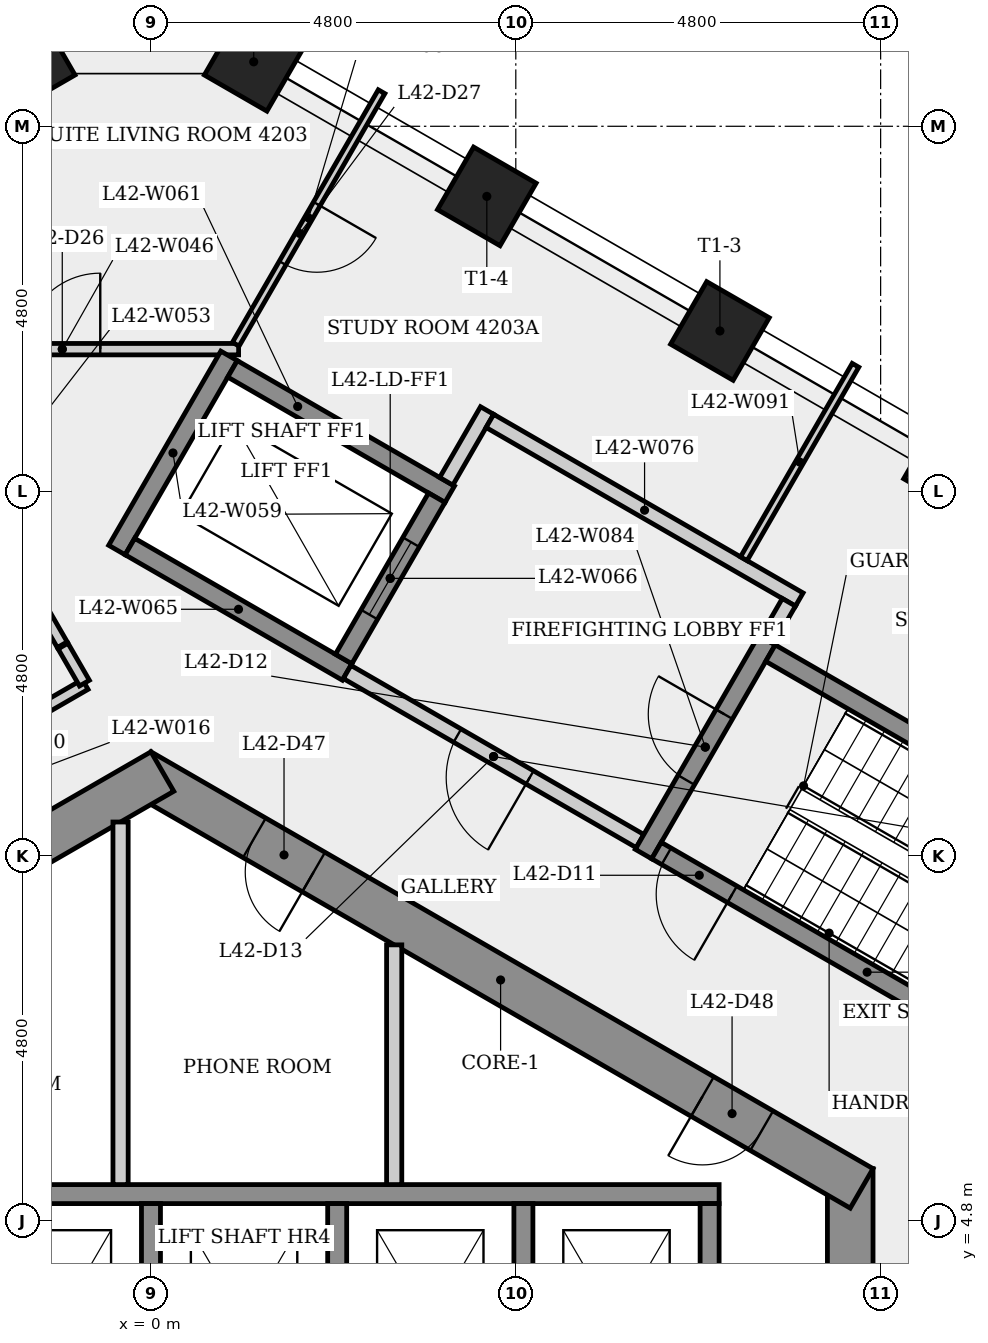
"""IFC4 building model, lengths in metres.
Left out: names, types, materials, properties, quantities, classifications, styles, units other than length and angle.
Written with IfcOpenShell. Run it as: python <this file> out.ifc"""

import sys

from ifc_helpers import new_model, si_unit, direction, frame, frame_2d, origin, origin_2d, place, context, subcontext, project, spatial, rectangle, extrude, element, fill, save


model = new_model("IFC4")
c1 = context("Model", 3, precision=1e-05, world=origin(), true_north=direction((0.0, 1.0)))
c2 = subcontext(c1, "Body", "Model", "MODEL_VIEW")
j1 = project(units=[si_unit("LENGTHUNIT", "METRE"), si_unit("PLANEANGLEUNIT", "RADIAN")], contexts=[c1])
p1 = place(None, origin())
s1 = spatial("IfcSite", under=j1, at=p1, CompositionType="ELEMENT")
p2 = place(p1, origin())
s2 = spatial("IfcBuilding", under=s1, at=p2, CompositionType="ELEMENT")
p3 = place(p2, frame((0.0, 0.0, 159.5)))
s3 = spatial("IfcBuildingStorey", under=s2, at=p3, CompositionType="ELEMENT", Elevation=159.5)
p4 = place(p3, frame((9.2, -5.485, 0.0), z_axis=(0.0, 0.0, 1.0), x_axis=(0.0, 1.0, 0.0)))
e1 = element("IfcWall", 1, at=p4, inside=s3, PredefinedType="SHEAR", context=c2, shape_type="SweptSolid", body=[
    extrude(rectangle(XDim=10.97, YDim=0.6, at=frame_2d((5.485, 0.0))), origin(), (0.0, 0.0, 1.0), 3.4),
])
p5 = place(p4, frame((4.685, 0.0, 0.0)))
e2 = element("IfcOpeningElement", 2, at=p5, cuts=e1, PredefinedType="OPENING", context=c2, shape_type="SweptSolid", body=[
    extrude(rectangle(XDim=1.6, YDim=2.1, at=frame_2d((0.8, 1.05))), frame((0.0, 0.31, 0.0), z_axis=(0.0, -1.0, 0.0), x_axis=(1.0, 0.0, 0.0)), (0.0, 0.0, 1.0), 0.62),
])
p6 = place(p3, frame((9.35, 5.225, 0.0), z_axis=(0.0, 0.0, 1.0), x_axis=(-0.866023993627, 0.500002442456, 0.0)))
e3 = element("IfcWall", 3, at=p6, inside=s3, PredefinedType="SHEAR", context=c2, shape_type="SweptSolid", body=[
    extrude(rectangle(XDim=10.97, YDim=0.6, at=frame_2d((5.485, 0.0))), origin(), (0.0, 0.0, 1.0), 3.4),
])
p7 = place(p6, frame((8.325, 0.0, 0.0)))
e4 = element("IfcOpeningElement", 4, at=p7, cuts=e3, PredefinedType="OPENING", context=c2, shape_type="SweptSolid", body=[
    extrude(rectangle(XDim=0.9, YDim=2.1, at=frame_2d((0.45, 1.05))), frame((0.0, 0.31, 0.0), z_axis=(0.0, -1.0, 0.0), x_axis=(1.0, 0.0, 0.0)), (0.0, 0.0, 1.0), 0.62),
])
p8 = place(p6, frame((1.518, 0.0, 0.0)))
e5 = element("IfcOpeningElement", 5, at=p8, cuts=e3, PredefinedType="OPENING", context=c2, shape_type="SweptSolid", body=[
    extrude(rectangle(XDim=0.9, YDim=2.1, at=frame_2d((0.45, 1.05))), frame((0.0, 0.31, 0.0), z_axis=(0.0, -1.0, 0.0), x_axis=(1.0, 0.0, 0.0)), (0.0, 0.0, 1.0), 0.62),
])
p9 = place(p3, frame((0.15, 10.71, 0.0), z_axis=(0.0, 0.0, 1.0), x_axis=(-0.866023993627, -0.500002442456, 0.0)))
e6 = element("IfcWall", 6, at=p9, inside=s3, PredefinedType="SHEAR", context=c2, shape_type="SweptSolid", body=[
    extrude(rectangle(XDim=10.97, YDim=0.6, at=frame_2d((5.485, 0.0))), origin(), (0.0, 0.0, 1.0), 3.4),
])
p10 = place(p9, frame((9.013, 0.0, 0.0)))
e7 = element("IfcOpeningElement", 7, at=p10, cuts=e6, PredefinedType="OPENING", context=c2, shape_type="SweptSolid", body=[
    extrude(rectangle(XDim=0.9, YDim=2.1, at=frame_2d((0.45, 1.05))), frame((0.0, 0.31, 0.0), z_axis=(0.0, -1.0, 0.0), x_axis=(1.0, 0.0, 0.0)), (0.0, 0.0, 1.0), 0.62),
])
p11 = place(p9, frame((2.437, 0.0, 0.0)))
e8 = element("IfcOpeningElement", 8, at=p11, cuts=e6, PredefinedType="OPENING", context=c2, shape_type="SweptSolid", body=[
    extrude(rectangle(XDim=0.9, YDim=2.1, at=frame_2d((0.45, 1.05))), frame((0.0, 0.31, 0.0), z_axis=(0.0, -1.0, 0.0), x_axis=(1.0, 0.0, 0.0)), (0.0, 0.0, 1.0), 0.62),
])
for number, where, z_axis, x_axis in (
    (9, (10.552, 14.736, 0.0), (0.0, 0.0, 1.0), (0.5, 0.866, 0.0)),
    (10, (7.486, 16.507, 0.0), (0.0, 0.0, 1.0), (0.5, 0.866, 0.0)),
    (11, (4.419, 18.278, 0.0), (0.0, 0.0, 1.0), (0.5, 0.866, 0.0)),
    (12, (1.352, 20.048, 0.0), (0.0, 0.0, 1.0), (0.5, 0.866, 0.0)),
    (13, (-1.648, 20.048, 0.0), (0.0, 0.0, 1.0), (-0.5, 0.866, 0.0)),
):
    element("IfcColumn", number, at=place(p3, frame(where, z_axis=z_axis, x_axis=x_axis)), inside=s3, PredefinedType="COLUMN", context=c2, shape_type="SweptSolid", body=[
        extrude(rectangle(XDim=0.95, YDim=0.95, at=origin_2d()), origin(), (0.0, 0.0, 1.0), 3.4),
    ])
p12 = place(p3, frame((-9.77, 6.715, 0.0), z_axis=(0.0, 0.0, 1.0), x_axis=(0.866022281964, 0.500005407112, 0.0)))
e14 = element("IfcWall", 14, at=p12, inside=s3, PredefinedType="PARTITIONING", context=c2, shape_type="SweptSolid", body=[
    extrude(rectangle(XDim=10.282, YDim=0.15, at=frame_2d((5.141, 0.0))), origin(), (0.0, 0.0, 1.0), 3.05),
])
p13 = place(p12, frame((3.777, 0.0, 0.0)))
e15 = element("IfcOpeningElement", 15, at=p13, cuts=e14, PredefinedType="OPENING", context=c2, shape_type="SweptSolid", body=[
    extrude(rectangle(XDim=0.9, YDim=2.1, at=frame_2d((0.45, 1.05))), frame((0.0, 0.085, 0.0), z_axis=(0.0, -1.0, 0.0), x_axis=(1.0, 0.0, 0.0)), (0.0, 0.0, 1.0), 0.17),
])
p14 = place(p3, frame((-7.225, 5.15, 0.0), z_axis=(0.0, 0.0, 1.0), x_axis=(1.0, 0.0, 0.0)))
e16 = element("IfcWall", 16, at=p14, inside=s3, PredefinedType="SHEAR", context=c2, shape_type="SweptSolid", body=[
    extrude(rectangle(XDim=14.7, YDim=0.25, at=frame_2d((7.35, 0.0))), origin(), (0.0, 0.0, 1.0), 3.05),
])
p15 = place(p3, frame((-3.487, 16.267, 0.0), z_axis=(0.0, 0.0, 1.0), x_axis=(1.0, 0.0, 0.0)))
e17 = element("IfcWall", 17, at=p15, inside=s3, PredefinedType="PARTITIONING", context=c2, shape_type="SweptSolid", body=[
    extrude(rectangle(XDim=4.64, YDim=0.15, at=frame_2d((2.32, 0.0))), origin(), (0.0, 0.0, 1.0), 3.05),
])
p16 = place(p15, frame((1.82, 0.0, 0.0)))
e18 = element("IfcOpeningElement", 18, at=p16, cuts=e17, PredefinedType="OPENING", context=c2, shape_type="SweptSolid", body=[
    extrude(rectangle(XDim=1.0, YDim=2.1, at=frame_2d((0.5, 1.05))), frame((0.0, 0.085, 0.0), z_axis=(0.0, -1.0, 0.0), x_axis=(1.0, 0.0, 0.0)), (0.0, 0.0, 1.0), 0.17),
])
p17 = place(p3, frame((-1.167, 12.378, 0.0), z_axis=(0.0, 0.0, 1.0), x_axis=(-0.499998454624, 0.866026296006, 0.0)))
e19 = element("IfcWall", 19, at=p17, inside=s3, PredefinedType="PARTITIONING", context=c2, shape_type="SweptSolid", body=[
    extrude(rectangle(XDim=4.416, YDim=0.15, at=frame_2d((2.208, 0.0))), origin(), (0.0, 0.0, 1.0), 3.05),
])
p18 = place(p17, frame((1.758, 0.0, 0.0)))
e20 = element("IfcOpeningElement", 20, at=p18, cuts=e19, PredefinedType="OPENING", context=c2, shape_type="SweptSolid", body=[
    extrude(rectangle(XDim=0.9, YDim=2.1, at=frame_2d((0.45, 1.05))), frame((0.0, 0.085, 0.0), z_axis=(0.0, -1.0, 0.0), x_axis=(1.0, 0.0, 0.0)), (0.0, 0.0, 1.0), 0.17),
])
p19 = place(p3, frame((-1.157, 12.361, 0.0), z_axis=(0.0, 0.0, 1.0), x_axis=(0.499959971872, -0.866048512801, 0.0)))
e21 = element("IfcWall", 21, at=p19, inside=s3, PredefinedType="PARTITIONING", context=c2, shape_type="SweptSolid", body=[
    extrude(rectangle(XDim=0.563, YDim=0.15, at=frame_2d((0.282, 0.0))), origin(), (0.0, 0.0, 1.0), 3.05),
])
p20 = place(p3, frame((-0.4, 10.046, 0.0), z_axis=(0.0, 0.0, 1.0), x_axis=(0.0, -1.0, 0.0)))
e22 = element("IfcWall", 22, at=p20, inside=s3, PredefinedType="PARTITIONING", context=c2, shape_type="SweptSolid", body=[
    extrude(rectangle(XDim=4.771, YDim=0.2, at=frame_2d((2.385, 0.0))), origin(), (0.0, 0.0, 1.0), 3.05),
])
p21 = place(p3, frame((-0.448, 13.624, 0.0), z_axis=(0.0, 0.0, 1.0), x_axis=(0.500037662692, 0.866003658127, 0.0)))
e23 = element("IfcWall", 23, at=p21, inside=s3, PredefinedType="SHEAR", context=c2, shape_type="SweptSolid", body=[
    extrude(rectangle(XDim=2.95, YDim=0.25, at=frame_2d((1.475, 0.0))), origin(), (0.0, 0.0, 1.0), 3.05),
])
p22 = place(p3, frame((0.0, 5.025, 0.0), z_axis=(0.0, 0.0, 1.0), x_axis=(0.0, -1.0, 0.0)))
e24 = element("IfcWall", 24, at=p22, inside=s3, PredefinedType="SHEAR", context=c2, shape_type="SweptSolid", body=[
    extrude(rectangle(XDim=3.1, YDim=0.25, at=frame_2d((1.55, 0.0))), origin(), (0.0, 0.0, 1.0), 3.4),
])
p23 = place(p3, frame((1.073, 16.008, 0.0), z_axis=(0.0, 0.0, 1.0), x_axis=(0.866040211805, -0.499974350878, 0.0)))
e25 = element("IfcWall", 25, at=p23, inside=s3, PredefinedType="SHEAR", context=c2, shape_type="SweptSolid", body=[
    extrude(rectangle(XDim=3.3, YDim=0.25, at=frame_2d((1.65, 0.0))), origin(), (0.0, 0.0, 1.0), 3.05),
])
p24 = place(p3, frame((2.45, 5.025, 0.0), z_axis=(0.0, 0.0, 1.0), x_axis=(0.0, -1.0, 0.0)))
e26 = element("IfcWall", 26, at=p24, inside=s3, PredefinedType="SHEAR", context=c2, shape_type="SweptSolid", body=[
    extrude(rectangle(XDim=3.1, YDim=0.25, at=frame_2d((1.55, 0.0))), origin(), (0.0, 0.0, 1.0), 3.4),
])
p25 = place(p3, frame((2.581, 12.02, 0.0), z_axis=(0.0, 0.0, 1.0), x_axis=(-0.866040211805, 0.499974350878, 0.0)))
e27 = element("IfcWall", 27, at=p25, inside=s3, PredefinedType="SHEAR", context=c2, shape_type="SweptSolid", body=[
    extrude(rectangle(XDim=3.3, YDim=0.25, at=frame_2d((1.65, 0.0))), origin(), (0.0, 0.0, 1.0), 3.05),
])
p26 = place(p3, frame((2.535, 12.191, 0.0), z_axis=(0.0, 0.0, 1.0), x_axis=(0.500061746146, 0.865989751695, 0.0)))
e28 = element("IfcWall", 28, at=p26, inside=s3, PredefinedType="SHEAR", context=c2, shape_type="SweptSolid", body=[
    extrude(rectangle(XDim=2.45, YDim=0.25, at=frame_2d((1.225, 0.0))), origin(), (0.0, 0.0, 1.0), 3.4),
])
p27 = place(p26, frame((0.675, 0.0, 0.0)))
e29 = element("IfcOpeningElement", 29, at=p27, cuts=e28, PredefinedType="OPENING", context=c2, shape_type="SweptSolid", body=[
    extrude(rectangle(XDim=1.1, YDim=2.1, at=frame_2d((0.55, 1.05))), frame((0.0, 0.135, 0.0), z_axis=(0.0, -1.0, 0.0), x_axis=(1.0, 0.0, 0.0)), (0.0, 0.0, 1.0), 0.27),
])
p28 = place(p3, frame((3.034, 19.655, 0.0), z_axis=(0.0, 0.0, 1.0), x_axis=(-0.500012543355, -0.866018161754, 0.0)))
e30 = element("IfcWall", 30, at=p28, inside=s3, PredefinedType="PARTITIONING", context=c2, shape_type="SweptSolid", body=[
    extrude(rectangle(XDim=3.837, YDim=0.1, at=frame_2d((1.918, 0.0))), origin(), (0.0, 0.0, 1.0), 3.05),
])
p29 = place(p28, frame((1.704, 0.0, 0.0)))
e31 = element("IfcOpeningElement", 31, at=p29, cuts=e30, PredefinedType="OPENING", context=c2, shape_type="SweptSolid", body=[
    extrude(rectangle(XDim=0.9, YDim=2.1, at=frame_2d((0.45, 1.05))), frame((0.0, 0.06, 0.0), z_axis=(0.0, -1.0, 0.0), x_axis=(1.0, 0.0, 0.0)), (0.0, 0.0, 1.0), 0.12),
])
p30 = place(p3, frame((3.2, 8.429, 0.0), z_axis=(0.0, 0.0, 1.0), x_axis=(0.0, -1.0, 0.0)))
e32 = element("IfcWall", 32, at=p30, inside=s3, PredefinedType="PARTITIONING", context=c2, shape_type="SweptSolid", body=[
    extrude(rectangle(XDim=3.154, YDim=0.2, at=frame_2d((1.577, 0.0))), origin(), (0.0, 0.0, 1.0), 3.05),
])
p31 = place(p3, frame((3.885, 14.529, 0.0), z_axis=(0.0, 0.0, 1.0), x_axis=(0.499997628298, 0.866026773083, 0.0)))
e33 = element("IfcWall", 33, at=p31, inside=s3, PredefinedType="PARTITIONING", context=c2, shape_type="SweptSolid", body=[
    extrude(rectangle(XDim=1.075, YDim=0.2, at=frame_2d((0.538, 0.0))), origin(), (0.0, 0.0, 1.0), 3.05),
])
p32 = place(p3, frame((4.459, 15.323, 0.0), z_axis=(0.0, 0.0, 1.0), x_axis=(0.866016039709, -0.500016218704, 0.0)))
e34 = element("IfcWall", 34, at=p32, inside=s3, PredefinedType="PARTITIONING", context=c2, shape_type="SweptSolid", body=[
    extrude(rectangle(XDim=4.7, YDim=0.2, at=frame_2d((2.35, 0.0))), origin(), (0.0, 0.0, 1.0), 3.05),
])
p33 = place(p3, frame((4.9, 5.025, 0.0), z_axis=(0.0, 0.0, 1.0), x_axis=(0.0, -1.0, 0.0)))
e35 = element("IfcWall", 35, at=p33, inside=s3, PredefinedType="SHEAR", context=c2, shape_type="SweptSolid", body=[
    extrude(rectangle(XDim=3.1, YDim=0.25, at=frame_2d((1.55, 0.0))), origin(), (0.0, 0.0, 1.0), 3.4),
])
p34 = place(p3, frame((6.435, 9.795, 0.0), z_axis=(0.0, 0.0, 1.0), x_axis=(-0.866012907634, 0.500021643343, 0.0)))
e36 = element("IfcWall", 36, at=p34, inside=s3, PredefinedType="PARTITIONING", context=c2, shape_type="SweptSolid", body=[
    extrude(rectangle(XDim=4.45, YDim=0.2, at=frame_2d((2.225, 0.0))), origin(), (0.0, 0.0, 1.0), 3.05),
])
p35 = place(p34, frame((1.675, 0.0, 0.0)))
e37 = element("IfcOpeningElement", 37, at=p35, cuts=e36, PredefinedType="OPENING", context=c2, shape_type="SweptSolid", body=[
    extrude(rectangle(XDim=1.1, YDim=2.1, at=frame_2d((0.55, 1.05))), frame((0.0, 0.11, 0.0), z_axis=(0.0, -1.0, 0.0), x_axis=(1.0, 0.0, 0.0)), (0.0, 0.0, 1.0), 0.22),
])
p36 = place(p3, frame((6.48, 9.624, 0.0), z_axis=(0.0, 0.0, 1.0), x_axis=(0.500017246033, 0.866015446554, 0.0)))
e38 = element("IfcWall", 38, at=p36, inside=s3, PredefinedType="SHEAR", context=c2, shape_type="SweptSolid", body=[
    extrude(rectangle(XDim=3.25, YDim=0.25, at=frame_2d((1.625, 0.0))), origin(), (0.0, 0.0, 1.0), 3.05),
])
p37 = place(p36, frame((1.125, 0.0, 0.0)))
e39 = element("IfcOpeningElement", 39, at=p37, cuts=e38, PredefinedType="OPENING", context=c2, shape_type="SweptSolid", body=[
    extrude(rectangle(XDim=1.0, YDim=2.1, at=frame_2d((0.5, 1.05))), frame((0.0, 0.135, 0.0), z_axis=(0.0, -1.0, 0.0), x_axis=(1.0, 0.0, 0.0)), (0.0, 0.0, 1.0), 0.27),
])
p38 = place(p3, frame((7.35, 5.025, 0.0), z_axis=(0.0, 0.0, 1.0), x_axis=(0.0, -1.0, 0.0)))
e40 = element("IfcWall", 40, at=p38, inside=s3, PredefinedType="SHEAR", context=c2, shape_type="SweptSolid", body=[
    extrude(rectangle(XDim=3.1, YDim=0.25, at=frame_2d((1.55, 0.0))), origin(), (0.0, 0.0, 1.0), 3.4),
])
p39 = place(p3, frame((7.8, 13.51, 0.0), z_axis=(0.0, 0.0, 1.0), x_axis=(0.499945384066, 0.866056934013, 0.0)))
e41 = element("IfcWall", 41, at=p39, inside=s3, PredefinedType="PARTITIONING", context=c2, shape_type="SweptSolid", body=[
    extrude(rectangle(XDim=2.939, YDim=0.1, at=frame_2d((1.469, 0.0))), origin(), (0.0, 0.0, 1.0), 3.05),
])
p40 = place(p3, frame((8.151, 12.268, 0.0), z_axis=(0.0, 0.0, 1.0), x_axis=(0.866025499775, -0.499999833739, 0.0)))
e42 = element("IfcWall", 42, at=p40, inside=s3, PredefinedType="SHEAR", context=c2, shape_type="SweptSolid", body=[
    extrude(rectangle(XDim=6.4, YDim=0.25, at=frame_2d((3.2, 0.0))), origin(), (0.0, 0.0, 1.0), 3.05),
])
p41 = place(p3, frame((8.393, 12.937, 0.0), z_axis=(0.0, 0.0, 1.0), x_axis=(-0.500065409566, -0.86598763626, 0.0)))
e43 = element("IfcWall", 43, at=p41, inside=s3, PredefinedType="PARTITIONING", context=c2, shape_type="SweptSolid", body=[
    extrude(rectangle(XDim=0.575, YDim=0.2, at=frame_2d((0.288, 0.0))), origin(), (0.0, 0.0, 1.0), 3.05),
])
p42 = place(p3, frame((12.194, 6.47, 0.0), z_axis=(0.0, 0.0, 1.0), x_axis=(-0.866025499775, 0.499999833739, 0.0)))
e44 = element("IfcWall", 44, at=p42, inside=s3, PredefinedType="SHEAR", context=c2, shape_type="SweptSolid", body=[
    extrude(rectangle(XDim=6.4, YDim=0.25, at=frame_2d((3.2, 0.0))), origin(), (0.0, 0.0, 1.0), 3.05),
])
p43 = place(p42, frame((5.25, 0.0, 0.0)))
e45 = element("IfcOpeningElement", 45, at=p43, cuts=e44, PredefinedType="OPENING", context=c2, shape_type="SweptSolid", body=[
    extrude(rectangle(XDim=1.0, YDim=2.1, at=frame_2d((0.5, 1.05))), frame((0.0, 0.135, 0.0), z_axis=(0.0, -1.0, 0.0), x_axis=(1.0, 0.0, 0.0)), (0.0, 0.0, 1.0), 0.27),
])
p44 = place(p43, origin())
e46 = element("IfcDoor", 46, at=p44, inside=s3, OperationType="SINGLE_SWING_LEFT", PredefinedType="DOOR", context=c2, shape_type="SweptSolid", body=[
    extrude(rectangle(XDim=1.0, YDim=2.1, at=frame_2d((0.5, 1.05))), frame((0.0, 0.025, 0.0), z_axis=(0.0, -1.0, 0.0), x_axis=(1.0, 0.0, 0.0)), (0.0, 0.0, 1.0), 0.05),
])
fill(e45, e46)
p45 = place(p37, origin())
e47 = element("IfcDoor", 47, at=p45, inside=s3, OperationType="SINGLE_SWING_RIGHT", PredefinedType="DOOR", context=c2, shape_type="SweptSolid", body=[
    extrude(rectangle(XDim=1.0, YDim=2.1, at=frame_2d((0.5, 1.05))), frame((0.0, 0.025, 0.0), z_axis=(0.0, -1.0, 0.0), x_axis=(1.0, 0.0, 0.0)), (0.0, 0.0, 1.0), 0.05),
])
fill(e39, e47)
p46 = place(p35, origin())
e48 = element("IfcDoor", 48, at=p46, inside=s3, OperationType="SINGLE_SWING_LEFT", PredefinedType="DOOR", context=c2, shape_type="SweptSolid", body=[
    extrude(rectangle(XDim=1.1, YDim=2.1, at=frame_2d((0.55, 1.05))), frame((0.0, 0.025, 0.0), z_axis=(0.0, -1.0, 0.0), x_axis=(1.0, 0.0, 0.0)), (0.0, 0.0, 1.0), 0.05),
])
fill(e37, e48)
p47 = place(p27, origin())
e49 = element("IfcDoor", 49, at=p47, inside=s3, OperationType="SLIDING_TO_LEFT", PredefinedType="DOOR", context=c2, shape_type="SweptSolid", body=[
    extrude(rectangle(XDim=1.1, YDim=2.1, at=frame_2d((0.55, 1.05))), frame((0.0, 0.025, 0.0), z_axis=(0.0, -1.0, 0.0), x_axis=(1.0, 0.0, 0.0)), (0.0, 0.0, 1.0), 0.05),
])
fill(e29, e49)
p48 = place(p16, origin())
e50 = element("IfcDoor", 50, at=p48, inside=s3, OperationType="SINGLE_SWING_RIGHT", PredefinedType="DOOR", context=c2, shape_type="SweptSolid", body=[
    extrude(rectangle(XDim=1.0, YDim=2.1, at=frame_2d((0.5, 1.05))), frame((0.0, 0.025, 0.0), z_axis=(0.0, -1.0, 0.0), x_axis=(1.0, 0.0, 0.0)), (0.0, 0.0, 1.0), 0.05),
])
fill(e18, e50)
p49 = place(p29, origin())
e51 = element("IfcDoor", 51, at=p49, inside=s3, OperationType="SINGLE_SWING_LEFT", PredefinedType="DOOR", context=c2, shape_type="SweptSolid", body=[
    extrude(rectangle(XDim=0.9, YDim=2.1, at=frame_2d((0.45, 1.05))), frame((0.0, 0.025, 0.0), z_axis=(0.0, -1.0, 0.0), x_axis=(1.0, 0.0, 0.0)), (0.0, 0.0, 1.0), 0.05),
])
fill(e31, e51)
p50 = place(p7, origin())
e52 = element("IfcDoor", 52, at=p50, inside=s3, OperationType="SINGLE_SWING_LEFT", PredefinedType="DOOR", context=c2, shape_type="SweptSolid", body=[
    extrude(rectangle(XDim=0.9, YDim=2.1, at=frame_2d((0.45, 1.05))), frame((0.0, 0.025, 0.0), z_axis=(0.0, -1.0, 0.0), x_axis=(1.0, 0.0, 0.0)), (0.0, 0.0, 1.0), 0.05),
])
fill(e4, e52)
p51 = place(p8, origin())
e53 = element("IfcDoor", 53, at=p51, inside=s3, OperationType="SINGLE_SWING_RIGHT", PredefinedType="DOOR", context=c2, shape_type="SweptSolid", body=[
    extrude(rectangle(XDim=0.9, YDim=2.1, at=frame_2d((0.45, 1.05))), frame((0.0, 0.025, 0.0), z_axis=(0.0, -1.0, 0.0), x_axis=(1.0, 0.0, 0.0)), (0.0, 0.0, 1.0), 0.05),
])
fill(e5, e53)
save(model, sys.argv[1])
